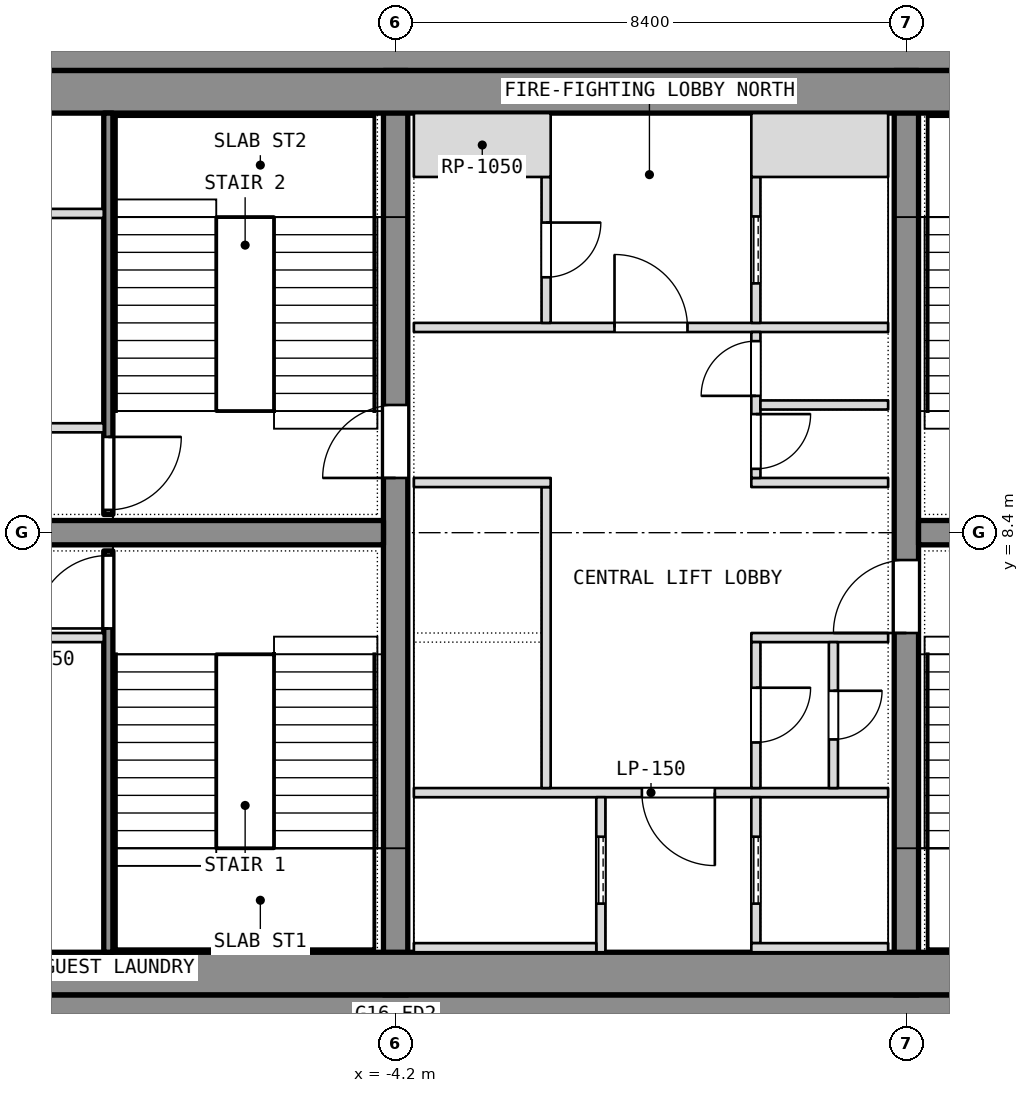
"""IFC4 building model, lengths in metres.
Left out: names, types, materials, properties, quantities, classifications, styles, units other than length and angle.
Written with IfcOpenShell. Run it as: python <this file> out.ifc"""

import sys

from ifc_helpers import new_model, si_unit, direction, frame, frame_2d, origin, place, context, subcontext, project, spatial, rectangle, extrude, element, fill, save


model = new_model("IFC4")
c1 = context("Model", 3, precision=1e-05, world=origin(), true_north=direction((0.0, 1.0)))
c2 = subcontext(c1, "Body", "Model", "MODEL_VIEW")
j1 = project(units=[si_unit("LENGTHUNIT", "METRE"), si_unit("PLANEANGLEUNIT", "RADIAN")], contexts=[c1])
p1 = place(None, origin())
s1 = spatial("IfcSite", under=j1, at=p1, CompositionType="ELEMENT")
p2 = place(p1, origin())
s2 = spatial("IfcBuilding", under=s1, at=p2, CompositionType="ELEMENT")
p3 = place(p2, frame((0.0, 0.0, 205.7)))
s3 = spatial("IfcBuildingStorey", under=s2, at=p3, CompositionType="ELEMENT", Elevation=205.7)
for number, where, z_axis, x_axis in (
    (1, (-11.1, 0.4, 0.0), (0.0, 0.0, 1.0), (1.0, 0.0, 0.0)),
    (2, (-11.1, 16.4, 0.0), (0.0, 0.0, 1.0), (1.0, 0.0, 0.0)),
):
    element("IfcWall", number, at=place(p3, frame(where, z_axis=z_axis, x_axis=x_axis)), inside=s3, PredefinedType="SHEAR", context=c2, shape_type="SweptSolid", body=[
        extrude(rectangle(XDim=22.2, YDim=0.8, at=frame_2d((11.1, 0.0))), origin(), (0.0, 0.0, 1.0), 3.6),
    ])
p4 = place(p3, frame((-4.2, 0.8, 0.0), z_axis=(0.0, 0.0, 1.0), x_axis=(0.0, 1.0, 0.0)))
e3 = element("IfcWall", 3, at=p4, inside=s3, PredefinedType="SHEAR", context=c2, shape_type="SweptSolid", body=[
    extrude(rectangle(XDim=15.2, YDim=0.4, at=frame_2d((7.6, 0.0))), origin(), (0.0, 0.0, 1.0), 3.6),
])
p5 = place(p4, frame((8.5, 0.0, 0.0)))
e4 = element("IfcOpeningElement", 4, at=p5, cuts=e3, PredefinedType="OPENING", context=c2, shape_type="SweptSolid", body=[
    extrude(rectangle(XDim=1.2, YDim=2.1, at=frame_2d((0.6, 1.05))), frame((0.0, 0.2, 0.0), z_axis=(0.0, -1.0, 0.0), x_axis=(1.0, 0.0, 0.0)), (0.0, 0.0, 1.0), 0.4),
])
p6 = place(p3, frame((4.2, 0.8, 0.0), z_axis=(0.0, 0.0, 1.0), x_axis=(0.0, 1.0, 0.0)))
e5 = element("IfcWall", 5, at=p6, inside=s3, PredefinedType="SHEAR", context=c2, shape_type="SweptSolid", body=[
    extrude(rectangle(XDim=15.2, YDim=0.4, at=frame_2d((7.6, 0.0))), origin(), (0.0, 0.0, 1.0), 3.6),
])
p7 = place(p6, frame((5.95, 0.0, 0.0)))
e6 = element("IfcOpeningElement", 6, at=p7, cuts=e5, PredefinedType="OPENING", context=c2, shape_type="SweptSolid", body=[
    extrude(rectangle(XDim=1.2, YDim=2.1, at=frame_2d((0.6, 1.05))), frame((0.0, 0.2, 0.0), z_axis=(0.0, -1.0, 0.0), x_axis=(1.0, 0.0, 0.0)), (0.0, 0.0, 1.0), 0.4),
])
for number, where, z_axis, x_axis in (
    (7, (-11.1, 8.4, 0.0), (0.0, 0.0, 1.0), (1.0, 0.0, 0.0)),
    (8, (4.4, 8.4, 0.0), (0.0, 0.0, 1.0), (1.0, 0.0, 0.0)),
):
    element("IfcWall", number, at=place(p3, frame(where, z_axis=z_axis, x_axis=x_axis)), inside=s3, PredefinedType="SHEAR", context=c2, shape_type="SweptSolid", body=[
        extrude(rectangle(XDim=6.7, YDim=0.4, at=frame_2d((3.35, 0.0))), origin(), (0.0, 0.0, 1.0), 3.6),
    ])
for number, where, z_axis, x_axis in (
    (9, (-11.1, 1.15, 0.0), (0.0, 0.0, 1.0), (1.0, 0.0, 0.0)),
    (10, (-11.1, 15.65, 0.0), (0.0, 0.0, 1.0), (1.0, 0.0, 0.0)),
):
    element("IfcWall", number, at=place(p3, frame(where, z_axis=z_axis, x_axis=x_axis)), inside=s3, PredefinedType="PARTITIONING", context=c2, shape_type="SweptSolid", body=[
        extrude(rectangle(XDim=22.2, YDim=0.7, at=frame_2d((11.1, 0.0))), origin(), (0.0, 0.0, 1.0), 3.34),
    ])
p8 = place(p3, frame((-8.925, 1.5, 0.0), z_axis=(0.0, 0.0, 1.0), x_axis=(0.0, 1.0, 0.0)))
e11 = element("IfcWall", 11, at=p8, inside=s3, PredefinedType="SHEAR", context=c2, shape_type="SweptSolid", body=[
    extrude(rectangle(XDim=6.6, YDim=0.15, at=frame_2d((3.3, 0.0))), origin(), (0.0, 0.0, 1.0), 3.34),
])
p9 = place(p8, frame((5.325, 0.0, 0.0)))
e12 = element("IfcOpeningElement", 12, at=p9, cuts=e11, PredefinedType="OPENING", context=c2, shape_type="SweptSolid", body=[
    extrude(rectangle(XDim=1.2, YDim=2.1, at=frame_2d((0.6, 1.05))), frame((0.0, 0.075, 0.0), z_axis=(0.0, -1.0, 0.0), x_axis=(1.0, 0.0, 0.0)), (0.0, 0.0, 1.0), 0.15),
])
p10 = place(p3, frame((-11.1, 6.675, 0.0), z_axis=(0.0, 0.0, 1.0), x_axis=(1.0, 0.0, 0.0)))
e13 = element("IfcWall", 13, at=p10, inside=s3, PredefinedType="PARTITIONING", context=c2, shape_type="SweptSolid", body=[
    extrude(rectangle(XDim=2.1, YDim=0.15, at=frame_2d((1.05, 0.0))), origin(), (0.0, 0.0, 1.0), 3.34),
])
p11 = place(p3, frame((-8.925, 8.7, 0.0), z_axis=(0.0, 0.0, 1.0), x_axis=(0.0, 1.0, 0.0)))
e14 = element("IfcWall", 14, at=p11, inside=s3, PredefinedType="SHEAR", context=c2, shape_type="SweptSolid", body=[
    extrude(rectangle(XDim=6.6, YDim=0.15, at=frame_2d((3.3, 0.0))), origin(), (0.0, 0.0, 1.0), 3.34),
])
p12 = place(p11, frame((0.075, 0.0, 0.0)))
e15 = element("IfcOpeningElement", 15, at=p12, cuts=e14, PredefinedType="OPENING", context=c2, shape_type="SweptSolid", body=[
    extrude(rectangle(XDim=1.2, YDim=2.1, at=frame_2d((0.6, 1.05))), frame((0.0, 0.075, 0.0), z_axis=(0.0, -1.0, 0.0), x_axis=(1.0, 0.0, 0.0)), (0.0, 0.0, 1.0), 0.15),
])
for number, where, z_axis, x_axis in (
    (16, (-11.1, 10.125, 0.0), (0.0, 0.0, 1.0), (1.0, 0.0, 0.0)),
    (17, (-11.1, 13.65, 0.0), (0.0, 0.0, 1.0), (1.0, 0.0, 0.0)),
):
    element("IfcWall", number, at=place(p3, frame(where, z_axis=z_axis, x_axis=x_axis)), inside=s3, PredefinedType="PARTITIONING", context=c2, shape_type="SweptSolid", body=[
        extrude(rectangle(XDim=2.1, YDim=0.15, at=frame_2d((1.05, 0.0))), origin(), (0.0, 0.0, 1.0), 3.34),
    ])
p13 = place(p3, frame((-3.9, 4.125, 0.0), z_axis=(0.0, 0.0, 1.0), x_axis=(1.0, 0.0, 0.0)))
e18 = element("IfcWall", 18, at=p13, inside=s3, PredefinedType="PARTITIONING", context=c2, shape_type="SweptSolid", body=[
    extrude(rectangle(XDim=7.8, YDim=0.15, at=frame_2d((3.9, 0.0))), origin(), (0.0, 0.0, 1.0), 3.34),
])
p14 = place(p13, frame((3.75, 0.0, 0.0)))
e19 = element("IfcOpeningElement", 19, at=p14, cuts=e18, PredefinedType="OPENING", context=c2, shape_type="SweptSolid", body=[
    extrude(rectangle(XDim=1.2, YDim=2.1, at=frame_2d((0.6, 1.05))), frame((0.0, 0.075, 0.0), z_axis=(0.0, -1.0, 0.0), x_axis=(1.0, 0.0, 0.0)), (0.0, 0.0, 1.0), 0.15),
])
p15 = place(p3, frame((-3.9, 11.775, 0.0), z_axis=(0.0, 0.0, 1.0), x_axis=(1.0, 0.0, 0.0)))
e20 = element("IfcWall", 20, at=p15, inside=s3, PredefinedType="PARTITIONING", context=c2, shape_type="SweptSolid", body=[
    extrude(rectangle(XDim=7.8, YDim=0.15, at=frame_2d((3.9, 0.0))), origin(), (0.0, 0.0, 1.0), 3.34),
])
p16 = place(p15, frame((3.3, 0.0, 0.0)))
e21 = element("IfcOpeningElement", 21, at=p16, cuts=e20, PredefinedType="OPENING", context=c2, shape_type="SweptSolid", body=[
    extrude(rectangle(XDim=1.2, YDim=2.1, at=frame_2d((0.6, 1.05))), frame((0.0, 0.075, 0.0), z_axis=(0.0, -1.0, 0.0), x_axis=(1.0, 0.0, 0.0)), (0.0, 0.0, 1.0), 0.15),
])
p17 = place(p3, frame((-0.825, 1.5, 0.0), z_axis=(0.0, 0.0, 1.0), x_axis=(0.0, 1.0, 0.0)))
e22 = element("IfcWall", 22, at=p17, inside=s3, PredefinedType="SHEAR", context=c2, shape_type="SweptSolid", body=[
    extrude(rectangle(XDim=2.55, YDim=0.15, at=frame_2d((1.275, 0.0))), origin(), (0.0, 0.0, 1.0), 3.6),
])
p18 = place(p17, frame((0.8, 0.0, 0.0)))
e23 = element("IfcOpeningElement", 23, at=p18, cuts=e22, PredefinedType="OPENING", context=c2, shape_type="SweptSolid", body=[
    extrude(rectangle(XDim=1.1, YDim=2.1, at=frame_2d((0.55, 1.05))), frame((0.0, 0.075, 0.0), z_axis=(0.0, -1.0, 0.0), x_axis=(1.0, 0.0, 0.0)), (0.0, 0.0, 1.0), 0.15),
])
p19 = place(p3, frame((-3.9, 1.575, 0.0), z_axis=(0.0, 0.0, 1.0), x_axis=(1.0, 0.0, 0.0)))
e24 = element("IfcWall", 24, at=p19, inside=s3, PredefinedType="SHEAR", context=c2, shape_type="SweptSolid", body=[
    extrude(rectangle(XDim=3.0, YDim=0.15, at=frame_2d((1.5, 0.0))), origin(), (0.0, 0.0, 1.0), 3.6),
])
p20 = place(p3, frame((-1.725, 4.2, 0.0), z_axis=(0.0, 0.0, 1.0), x_axis=(0.0, 1.0, 0.0)))
e25 = element("IfcWall", 25, at=p20, inside=s3, PredefinedType="SHEAR", context=c2, shape_type="SweptSolid", body=[
    extrude(rectangle(XDim=4.95, YDim=0.15, at=frame_2d((2.475, 0.0))), origin(), (0.0, 0.0, 1.0), 3.6),
])
p21 = place(p3, frame((-3.9, 9.225, 0.0), z_axis=(0.0, 0.0, 1.0), x_axis=(1.0, 0.0, 0.0)))
e26 = element("IfcWall", 26, at=p21, inside=s3, PredefinedType="SHEAR", context=c2, shape_type="SweptSolid", body=[
    extrude(rectangle(XDim=2.25, YDim=0.15, at=frame_2d((1.125, 0.0))), origin(), (0.0, 0.0, 1.0), 3.6),
])
p22 = place(p3, frame((-1.725, 11.85, 0.0), z_axis=(0.0, 0.0, 1.0), x_axis=(0.0, 1.0, 0.0)))
e27 = element("IfcWall", 27, at=p22, inside=s3, PredefinedType="PARTITIONING", context=c2, shape_type="SweptSolid", body=[
    extrude(rectangle(XDim=2.4, YDim=0.15, at=frame_2d((1.2, 0.0))), origin(), (0.0, 0.0, 1.0), 3.34),
])
p23 = place(p22, frame((0.75, 0.0, 0.0)))
e28 = element("IfcOpeningElement", 28, at=p23, cuts=e27, PredefinedType="OPENING", context=c2, shape_type="SweptSolid", body=[
    extrude(rectangle(XDim=0.9, YDim=2.1, at=frame_2d((0.45, 1.05))), frame((0.0, 0.075, 0.0), z_axis=(0.0, -1.0, 0.0), x_axis=(1.0, 0.0, 0.0)), (0.0, 0.0, 1.0), 0.15),
])
p24 = place(p3, frame((-3.9, 14.775, 0.0), z_axis=(0.0, 0.0, 1.0), x_axis=(1.0, 0.0, 0.0)))
e29 = element("IfcWall", 29, at=p24, inside=s3, PredefinedType="PARTITIONING", context=c2, shape_type="SweptSolid", body=[
    extrude(rectangle(XDim=2.25, YDim=1.05, at=frame_2d((1.125, 0.0))), origin(), (0.0, 0.0, 1.0), 3.34),
])
p25 = place(p3, frame((1.725, 1.65, 0.0), z_axis=(0.0, 0.0, 1.0), x_axis=(0.0, 1.0, 0.0)))
e30 = element("IfcWall", 30, at=p25, inside=s3, PredefinedType="SHEAR", context=c2, shape_type="SweptSolid", body=[
    extrude(rectangle(XDim=2.4, YDim=0.15, at=frame_2d((1.2, 0.0))), origin(), (0.0, 0.0, 1.0), 3.6),
])
p26 = place(p25, frame((0.65, 0.0, 0.0)))
e31 = element("IfcOpeningElement", 31, at=p26, cuts=e30, PredefinedType="OPENING", context=c2, shape_type="SweptSolid", body=[
    extrude(rectangle(XDim=1.1, YDim=2.1, at=frame_2d((0.55, 1.05))), frame((0.0, 0.075, 0.0), z_axis=(0.0, -1.0, 0.0), x_axis=(1.0, 0.0, 0.0)), (0.0, 0.0, 1.0), 0.15),
])
p27 = place(p3, frame((1.65, 1.575, 0.0), z_axis=(0.0, 0.0, 1.0), x_axis=(1.0, 0.0, 0.0)))
e32 = element("IfcWall", 32, at=p27, inside=s3, PredefinedType="SHEAR", context=c2, shape_type="SweptSolid", body=[
    extrude(rectangle(XDim=2.25, YDim=0.15, at=frame_2d((1.125, 0.0))), origin(), (0.0, 0.0, 1.0), 3.6),
])
p28 = place(p3, frame((1.725, 11.85, 0.0), z_axis=(0.0, 0.0, 1.0), x_axis=(0.0, 1.0, 0.0)))
e33 = element("IfcWall", 33, at=p28, inside=s3, PredefinedType="SHEAR", context=c2, shape_type="SweptSolid", body=[
    extrude(rectangle(XDim=2.4, YDim=0.15, at=frame_2d((1.2, 0.0))), origin(), (0.0, 0.0, 1.0), 3.6),
])
p29 = place(p28, frame((0.65, 0.0, 0.0)))
e34 = element("IfcOpeningElement", 34, at=p29, cuts=e33, PredefinedType="OPENING", context=c2, shape_type="SweptSolid", body=[
    extrude(rectangle(XDim=1.1, YDim=2.1, at=frame_2d((0.55, 1.05))), frame((0.0, 0.075, 0.0), z_axis=(0.0, -1.0, 0.0), x_axis=(1.0, 0.0, 0.0)), (0.0, 0.0, 1.0), 0.15),
])
p30 = place(p3, frame((1.65, 14.775, 0.0), z_axis=(0.0, 0.0, 1.0), x_axis=(1.0, 0.0, 0.0)))
e35 = element("IfcWall", 35, at=p30, inside=s3, PredefinedType="SHEAR", context=c2, shape_type="SweptSolid", body=[
    extrude(rectangle(XDim=2.25, YDim=1.05, at=frame_2d((1.125, 0.0))), origin(), (0.0, 0.0, 1.0), 3.6),
])
for number, where, z_axis, x_axis in (
    (36, (1.65, 6.675, 0.0), (0.0, 0.0, 1.0), (1.0, 0.0, 0.0)),
    (37, (1.65, 9.225, 0.0), (0.0, 0.0, 1.0), (1.0, 0.0, 0.0)),
):
    element("IfcWall", number, at=place(p3, frame(where, z_axis=z_axis, x_axis=x_axis)), inside=s3, PredefinedType="PARTITIONING", context=c2, shape_type="SweptSolid", body=[
        extrude(rectangle(XDim=2.25, YDim=0.15, at=frame_2d((1.125, 0.0))), origin(), (0.0, 0.0, 1.0), 3.34),
    ])
p31 = place(p3, frame((1.725, 4.2, 0.0), z_axis=(0.0, 0.0, 1.0), x_axis=(0.0, 1.0, 0.0)))
e38 = element("IfcWall", 38, at=p31, inside=s3, PredefinedType="PARTITIONING", context=c2, shape_type="SweptSolid", body=[
    extrude(rectangle(XDim=2.4, YDim=0.15, at=frame_2d((1.2, 0.0))), origin(), (0.0, 0.0, 1.0), 3.34),
])
p32 = place(p31, frame((0.75, 0.0, 0.0)))
e39 = element("IfcOpeningElement", 39, at=p32, cuts=e38, PredefinedType="OPENING", context=c2, shape_type="SweptSolid", body=[
    extrude(rectangle(XDim=0.9, YDim=2.1, at=frame_2d((0.45, 1.05))), frame((0.0, 0.075, 0.0), z_axis=(0.0, -1.0, 0.0), x_axis=(1.0, 0.0, 0.0)), (0.0, 0.0, 1.0), 0.15),
])
p33 = place(p3, frame((1.725, 9.3, 0.0), z_axis=(0.0, 0.0, 1.0), x_axis=(0.0, 1.0, 0.0)))
e40 = element("IfcWall", 40, at=p33, inside=s3, PredefinedType="PARTITIONING", context=c2, shape_type="SweptSolid", body=[
    extrude(rectangle(XDim=2.4, YDim=0.15, at=frame_2d((1.2, 0.0))), origin(), (0.0, 0.0, 1.0), 3.34),
])
p34 = place(p33, frame((0.15, 0.0, 0.0)))
e41 = element("IfcOpeningElement", 41, at=p34, cuts=e40, PredefinedType="OPENING", context=c2, shape_type="SweptSolid", body=[
    extrude(rectangle(XDim=0.9, YDim=2.1, at=frame_2d((0.45, 1.05))), frame((0.0, 0.075, 0.0), z_axis=(0.0, -1.0, 0.0), x_axis=(1.0, 0.0, 0.0)), (0.0, 0.0, 1.0), 0.15),
])
p35 = place(p33, frame((1.35, 0.0, 0.0)))
e42 = element("IfcOpeningElement", 42, at=p35, cuts=e40, PredefinedType="OPENING", context=c2, shape_type="SweptSolid", body=[
    extrude(rectangle(XDim=0.9, YDim=2.1, at=frame_2d((0.45, 1.05))), frame((0.0, 0.075, 0.0), z_axis=(0.0, -1.0, 0.0), x_axis=(1.0, 0.0, 0.0)), (0.0, 0.0, 1.0), 0.15),
])
p36 = place(p3, frame((3.0, 4.2, 0.0), z_axis=(0.0, 0.0, 1.0), x_axis=(0.0, 1.0, 0.0)))
e43 = element("IfcWall", 43, at=p36, inside=s3, PredefinedType="PARTITIONING", context=c2, shape_type="SweptSolid", body=[
    extrude(rectangle(XDim=2.4, YDim=0.15, at=frame_2d((1.2, 0.0))), origin(), (0.0, 0.0, 1.0), 3.34),
])
p37 = place(p36, frame((0.8, 0.0, 0.0)))
e44 = element("IfcOpeningElement", 44, at=p37, cuts=e43, PredefinedType="OPENING", context=c2, shape_type="SweptSolid", body=[
    extrude(rectangle(XDim=0.8, YDim=2.1, at=frame_2d((0.4, 1.05))), frame((0.0, 0.075, 0.0), z_axis=(0.0, -1.0, 0.0), x_axis=(1.0, 0.0, 0.0)), (0.0, 0.0, 1.0), 0.15),
])
p38 = place(p3, frame((1.8, 10.5, 0.0), z_axis=(0.0, 0.0, 1.0), x_axis=(1.0, 0.0, 0.0)))
e45 = element("IfcWall", 45, at=p38, inside=s3, PredefinedType="PARTITIONING", context=c2, shape_type="SweptSolid", body=[
    extrude(rectangle(XDim=2.1, YDim=0.15, at=frame_2d((1.05, 0.0))), origin(), (0.0, 0.0, 1.0), 3.34),
])
p39 = place(p9, origin())
e46 = element("IfcDoor", 46, at=p39, inside=s3, OperationType="SINGLE_SWING_LEFT", PredefinedType="DOOR", context=c2, shape_type="SweptSolid", body=[
    extrude(rectangle(XDim=1.2, YDim=2.1, at=frame_2d((0.6, 1.05))), frame((0.0, 0.025, 0.0), z_axis=(0.0, -1.0, 0.0), x_axis=(1.0, 0.0, 0.0)), (0.0, 0.0, 1.0), 0.05),
])
fill(e12, e46)
p40 = place(p12, origin())
e47 = element("IfcDoor", 47, at=p40, inside=s3, OperationType="SINGLE_SWING_LEFT", PredefinedType="DOOR", context=c2, shape_type="SweptSolid", body=[
    extrude(rectangle(XDim=1.2, YDim=2.1, at=frame_2d((0.6, 1.05))), frame((0.0, 0.025, 0.0), z_axis=(0.0, -1.0, 0.0), x_axis=(1.0, 0.0, 0.0)), (0.0, 0.0, 1.0), 0.05),
])
fill(e15, e47)
p41 = place(p32, origin())
e48 = element("IfcDoor", 48, at=p41, inside=s3, OperationType="SINGLE_SWING_LEFT", PredefinedType="DOOR", context=c2, shape_type="SweptSolid", body=[
    extrude(rectangle(XDim=0.9, YDim=2.1, at=frame_2d((0.45, 1.05))), frame((0.0, 0.025, 0.0), z_axis=(0.0, -1.0, 0.0), x_axis=(1.0, 0.0, 0.0)), (0.0, 0.0, 1.0), 0.05),
])
fill(e39, e48)
p42 = place(p37, origin())
e49 = element("IfcDoor", 49, at=p42, inside=s3, OperationType="SINGLE_SWING_LEFT", PredefinedType="DOOR", context=c2, shape_type="SweptSolid", body=[
    extrude(rectangle(XDim=0.8, YDim=2.1, at=frame_2d((0.4, 1.05))), frame((0.0, 0.025, 0.0), z_axis=(0.0, -1.0, 0.0), x_axis=(1.0, 0.0, 0.0)), (0.0, 0.0, 1.0), 0.05),
])
fill(e44, e49)
p43 = place(p34, origin())
e50 = element("IfcDoor", 50, at=p43, inside=s3, OperationType="SINGLE_SWING_LEFT", PredefinedType="DOOR", context=c2, shape_type="SweptSolid", body=[
    extrude(rectangle(XDim=0.9, YDim=2.1, at=frame_2d((0.45, 1.05))), frame((0.0, 0.025, 0.0), z_axis=(0.0, -1.0, 0.0), x_axis=(1.0, 0.0, 0.0)), (0.0, 0.0, 1.0), 0.05),
])
fill(e41, e50)
p44 = place(p35, origin())
e51 = element("IfcDoor", 51, at=p44, inside=s3, OperationType="SINGLE_SWING_LEFT", PredefinedType="DOOR", context=c2, shape_type="SweptSolid", body=[
    extrude(rectangle(XDim=0.9, YDim=2.1, at=frame_2d((0.45, 1.05))), frame((0.0, 0.025, 0.0), z_axis=(0.0, -1.0, 0.0), x_axis=(1.0, 0.0, 0.0)), (0.0, 0.0, 1.0), 0.05),
])
fill(e42, e51)
p45 = place(p18, origin())
e52 = element("IfcDoor", 52, at=p45, inside=s3, OperationType="SLIDING_TO_LEFT", PredefinedType="DOOR", context=c2, shape_type="SweptSolid", body=[
    extrude(rectangle(XDim=1.1, YDim=2.1, at=frame_2d((0.55, 1.05))), frame((0.0, 0.025, 0.0), z_axis=(0.0, -1.0, 0.0), x_axis=(1.0, 0.0, 0.0)), (0.0, 0.0, 1.0), 0.05),
])
fill(e23, e52)
p46 = place(p26, origin())
e53 = element("IfcDoor", 53, at=p46, inside=s3, OperationType="SLIDING_TO_LEFT", PredefinedType="DOOR", context=c2, shape_type="SweptSolid", body=[
    extrude(rectangle(XDim=1.1, YDim=2.1, at=frame_2d((0.55, 1.05))), frame((0.0, 0.025, 0.0), z_axis=(0.0, -1.0, 0.0), x_axis=(1.0, 0.0, 0.0)), (0.0, 0.0, 1.0), 0.05),
])
fill(e31, e53)
p47 = place(p29, origin())
e54 = element("IfcDoor", 54, at=p47, inside=s3, OperationType="SLIDING_TO_LEFT", PredefinedType="DOOR", context=c2, shape_type="SweptSolid", body=[
    extrude(rectangle(XDim=1.1, YDim=2.1, at=frame_2d((0.55, 1.05))), frame((0.0, 0.025, 0.0), z_axis=(0.0, -1.0, 0.0), x_axis=(1.0, 0.0, 0.0)), (0.0, 0.0, 1.0), 0.05),
])
fill(e34, e54)
p48 = place(p14, origin())
e55 = element("IfcDoor", 55, at=p48, inside=s3, OperationType="SINGLE_SWING_LEFT", PredefinedType="DOOR", context=c2, shape_type="SweptSolid", body=[
    extrude(rectangle(XDim=1.2, YDim=2.1, at=frame_2d((0.6, 1.05))), frame((0.0, 0.025, 0.0), z_axis=(0.0, -1.0, 0.0), x_axis=(1.0, 0.0, 0.0)), (0.0, 0.0, 1.0), 0.05),
])
fill(e19, e55)
p49 = place(p16, origin())
e56 = element("IfcDoor", 56, at=p49, inside=s3, OperationType="SINGLE_SWING_LEFT", PredefinedType="DOOR", context=c2, shape_type="SweptSolid", body=[
    extrude(rectangle(XDim=1.2, YDim=2.1, at=frame_2d((0.6, 1.05))), frame((0.0, 0.025, 0.0), z_axis=(0.0, -1.0, 0.0), x_axis=(1.0, 0.0, 0.0)), (0.0, 0.0, 1.0), 0.05),
])
fill(e21, e56)
p50 = place(p23, origin())
e57 = element("IfcDoor", 57, at=p50, inside=s3, OperationType="SINGLE_SWING_LEFT", PredefinedType="DOOR", context=c2, shape_type="SweptSolid", body=[
    extrude(rectangle(XDim=0.9, YDim=2.1, at=frame_2d((0.45, 1.05))), frame((0.0, 0.025, 0.0), z_axis=(0.0, -1.0, 0.0), x_axis=(1.0, 0.0, 0.0)), (0.0, 0.0, 1.0), 0.05),
])
fill(e28, e57)
p51 = place(p5, origin())
e58 = element("IfcDoor", 58, at=p51, inside=s3, OperationType="SINGLE_SWING_LEFT", PredefinedType="DOOR", context=c2, shape_type="SweptSolid", body=[
    extrude(rectangle(XDim=1.2, YDim=2.1, at=frame_2d((0.6, 1.05))), frame((0.0, 0.025, 0.0), z_axis=(0.0, -1.0, 0.0), x_axis=(1.0, 0.0, 0.0)), (0.0, 0.0, 1.0), 0.05),
])
fill(e4, e58)
p52 = place(p7, origin())
e59 = element("IfcDoor", 59, at=p52, inside=s3, OperationType="SINGLE_SWING_LEFT", PredefinedType="DOOR", context=c2, shape_type="SweptSolid", body=[
    extrude(rectangle(XDim=1.2, YDim=2.1, at=frame_2d((0.6, 1.05))), frame((0.0, 0.025, 0.0), z_axis=(0.0, -1.0, 0.0), x_axis=(1.0, 0.0, 0.0)), (0.0, 0.0, 1.0), 0.05),
])
fill(e6, e59)
save(model, sys.argv[1])
